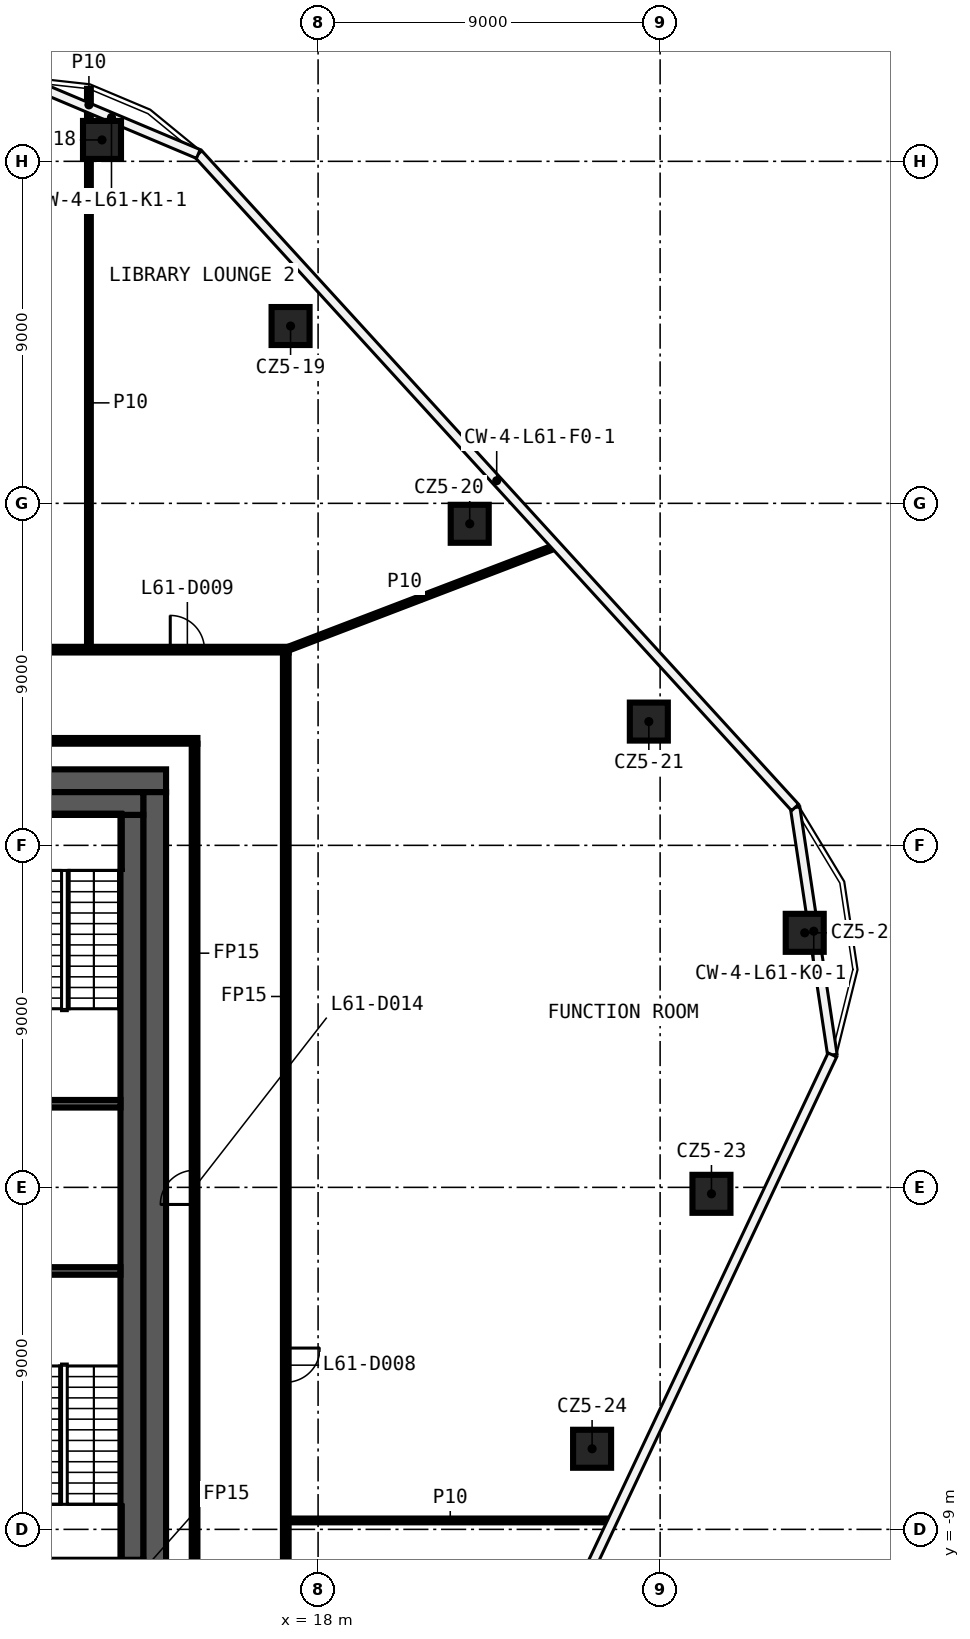
"""IFC4 building model, lengths in metres.
Left out: names, types, materials, properties, quantities, classifications, styles, units other than length and angle.
Written with IfcOpenShell. Run it as: python <this file> out.ifc"""

import sys

from ifc_helpers import new_model, si_unit, direction, frame, frame_2d, origin, origin_2d, place, context, subcontext, project, spatial, rectangle, extrude, element, fill, save


model = new_model("IFC4")
c1 = context("Model", 3, precision=1e-05, world=origin(), true_north=direction((0.0, 1.0)))
c2 = subcontext(c1, "Body", "Model", "MODEL_VIEW")
j1 = project(units=[si_unit("LENGTHUNIT", "METRE"), si_unit("PLANEANGLEUNIT", "RADIAN")], contexts=[c1])
p1 = place(None, origin())
s1 = spatial("IfcSite", under=j1, at=p1, CompositionType="ELEMENT")
p2 = place(p1, origin())
s2 = spatial("IfcBuilding", under=s1, at=p2, CompositionType="ELEMENT")
p3 = place(p2, frame((0.0, 0.0, 289.2)))
s3 = spatial("IfcBuildingStorey", under=s2, at=p3, CompositionType="ELEMENT", Elevation=289.2)
for number, where, z_axis, x_axis in (
    (1, (12.314, 27.563, 0.0), (0.0, 0.0, 1.0), (1.0, 0.0, 0.0)),
    (2, (17.276, 22.666, 0.0), (0.0, 0.0, 1.0), (1.0, 0.0, 0.0)),
    (3, (21.99, 17.462, 0.0), (0.0, 0.0, 1.0), (1.0, 0.0, 0.0)),
    (4, (26.703, 12.257, 0.0), (0.0, 0.0, 1.0), (1.0, 0.0, 0.0)),
    (5, (30.805, 6.698, 0.0), (0.0, 0.0, 1.0), (1.0, 0.0, 0.0)),
    (6, (28.351, -0.17, 0.0), (0.0, 0.0, 1.0), (1.0, 0.0, 0.0)),
    (7, (25.21, -6.879, 0.0), (0.0, 0.0, 1.0), (1.0, 0.0, 0.0)),
):
    element("IfcColumn", number, at=place(p3, frame(where, z_axis=z_axis, x_axis=x_axis)), inside=s3, PredefinedType="COLUMN", context=c2, shape_type="SweptSolid", body=[
        extrude(rectangle(XDim=1.0, YDim=1.0, at=origin_2d()), origin(), (0.0, 0.0, 1.0), 4.62),
    ])
p4 = place(p3, frame((17.225, -8.765, 0.0), z_axis=(0.0, 0.0, 1.0), x_axis=(1.0, 0.0, 0.0)))
e8 = element("IfcWall", 8, at=p4, inside=s3, PredefinedType="PARTITIONING", context=c2, shape_type="SweptSolid", body=[
    extrude(rectangle(XDim=8.505, YDim=0.1, at=frame_2d((4.253, 0.0))), origin(), (0.0, 0.0, 1.0), 4.62),
])
p5 = place(p3, frame((3.6, 11.75, 0.0), z_axis=(0.0, 0.0, 1.0), x_axis=(1.0, 0.0, 0.0)))
e9 = element("IfcWall", 9, at=p5, inside=s3, PredefinedType="PARTITIONING", context=c2, shape_type="SweptSolid", body=[
    extrude(rectangle(XDim=11.225, YDim=0.15, at=frame_2d((5.612, 0.0))), origin(), (0.0, 0.0, 1.0), 4.62),
])
p6 = place(p3, frame((-17.225, 14.15, 0.0), z_axis=(0.0, 0.0, 1.0), x_axis=(1.0, 0.0, 0.0)))
e10 = element("IfcWall", 10, at=p6, inside=s3, PredefinedType="PARTITIONING", context=c2, shape_type="SweptSolid", body=[
    extrude(rectangle(XDim=34.45, YDim=0.15, at=frame_2d((17.225, 0.0))), origin(), (0.0, 0.0, 1.0), 4.62),
])
p7 = place(p6, frame((31.335, 0.0, 0.0)))
e11 = element("IfcOpeningElement", 11, at=p7, cuts=e10, PredefinedType="OPENING", context=c2, shape_type="SweptSolid", body=[
    extrude(rectangle(XDim=0.9, YDim=2.1, at=frame_2d((0.45, 1.05))), frame((0.0, 0.085, 0.0), z_axis=(0.0, -1.0, 0.0), x_axis=(1.0, 0.0, 0.0)), (0.0, 0.0, 1.0), 0.17),
])
p8 = place(p6, frame((25.601, 0.0, 0.0)))
e12 = element("IfcOpeningElement", 12, at=p8, cuts=e10, PredefinedType="OPENING", context=c2, shape_type="SweptSolid", body=[
    extrude(rectangle(XDim=0.9, YDim=2.1, at=frame_2d((0.45, 1.05))), frame((0.0, 0.085, 0.0), z_axis=(0.0, -1.0, 0.0), x_axis=(1.0, 0.0, 0.0)), (0.0, 0.0, 1.0), 0.17),
])
p9 = place(p6, frame((17.852, 0.0, 0.0)))
e13 = element("IfcOpeningElement", 13, at=p9, cuts=e10, PredefinedType="OPENING", context=c2, shape_type="SweptSolid", body=[
    extrude(rectangle(XDim=0.9, YDim=2.1, at=frame_2d((0.45, 1.05))), frame((0.0, 0.085, 0.0), z_axis=(0.0, -1.0, 0.0), x_axis=(1.0, 0.0, 0.0)), (0.0, 0.0, 1.0), 0.17),
])
p10 = place(p3, frame((17.15, 14.15, 0.0), z_axis=(0.0, 0.0, 1.0), x_axis=(0.93402253364, 0.357214090782, 0.0)))
e14 = element("IfcWall", 14, at=p10, inside=s3, PredefinedType="PARTITIONING", context=c2, shape_type="SweptSolid", body=[
    extrude(rectangle(XDim=7.604, YDim=0.1, at=frame_2d((3.802, 0.0))), origin(), (0.0, 0.0, 1.0), 4.62),
])
p11 = place(p3, frame((17.15, 14.075, 0.0), z_axis=(0.0, 0.0, 1.0), x_axis=(0.0, -1.0, 0.0)))
e15 = element("IfcWall", 15, at=p11, inside=s3, PredefinedType="PARTITIONING", context=c2, shape_type="SweptSolid", body=[
    extrude(rectangle(XDim=28.15, YDim=0.15, at=frame_2d((14.075, 0.0))), origin(), (0.0, 0.0, 1.0), 4.62),
])
p12 = place(p11, frame((24.433, 0.0, 0.0)))
e16 = element("IfcOpeningElement", 16, at=p12, cuts=e15, PredefinedType="OPENING", context=c2, shape_type="SweptSolid", body=[
    extrude(rectangle(XDim=0.9, YDim=2.1, at=frame_2d((0.45, 1.05))), frame((0.0, 0.085, 0.0), z_axis=(0.0, -1.0, 0.0), x_axis=(1.0, 0.0, 0.0)), (0.0, 0.0, 1.0), 0.17),
])
p13 = place(p11, frame((18.304, 0.0, 0.0)))
e17 = element("IfcOpeningElement", 17, at=p13, cuts=e15, PredefinedType="OPENING", context=c2, shape_type="SweptSolid", body=[
    extrude(rectangle(XDim=0.9, YDim=2.1, at=frame_2d((0.45, 1.05))), frame((0.0, 0.085, 0.0), z_axis=(0.0, -1.0, 0.0), x_axis=(1.0, 0.0, 0.0)), (0.0, 0.0, 1.0), 0.17),
])
p14 = place(p3, frame((14.75, -11.675, 0.0), z_axis=(0.0, 0.0, 1.0), x_axis=(0.0, 1.0, 0.0)))
e18 = element("IfcWall", 18, at=p14, inside=s3, PredefinedType="PARTITIONING", context=c2, shape_type="SweptSolid", body=[
    extrude(rectangle(XDim=23.35, YDim=0.15, at=frame_2d((11.675, 0.0))), origin(), (0.0, 0.0, 1.0), 4.62),
])
p15 = place(p14, frame((11.225, 0.0, 0.0)))
e19 = element("IfcOpeningElement", 19, at=p15, cuts=e18, PredefinedType="OPENING", context=c2, shape_type="SweptSolid", body=[
    extrude(rectangle(XDim=0.9, YDim=2.1, at=frame_2d((0.45, 1.05))), frame((0.0, 0.085, 0.0), z_axis=(0.0, -1.0, 0.0), x_axis=(1.0, 0.0, 0.0)), (0.0, 0.0, 1.0), 0.17),
])
p16 = place(p3, frame((11.97, 14.225, 0.0), z_axis=(0.0, 0.0, 1.0), x_axis=(0.0, 1.0, 0.0)))
e20 = element("IfcWall", 20, at=p16, inside=s3, PredefinedType="PARTITIONING", context=c2, shape_type="SweptSolid", body=[
    extrude(rectangle(XDim=12.838, YDim=0.1, at=frame_2d((6.419, 0.0))), origin(), (0.0, 0.0, 1.0), 4.62),
])
p17 = place(p3, frame((11.97, 28.063, 0.0), z_axis=(0.0, 0.0, 1.0), x_axis=(0.0, 1.0, 0.0)))
e21 = element("IfcWall", 21, at=p17, inside=s3, PredefinedType="PARTITIONING", context=c2, shape_type="SweptSolid", body=[
    extrude(rectangle(XDim=0.845, YDim=0.1, at=frame_2d((0.423, 0.0))), origin(), (0.0, 0.0, 1.0), 4.62),
])
p18 = place(p3, frame((-14.0, 10.7, 0.0), z_axis=(0.0, 0.0, 1.0), x_axis=(1.0, 0.0, 0.0)))
e22 = element("IfcWall", 22, at=p18, inside=s3, PredefinedType="SHEAR", context=c2, shape_type="SweptSolid", body=[
    extrude(rectangle(XDim=28.0, YDim=0.6, at=frame_2d((14.0, 0.0))), origin(), (0.0, 0.0, 1.0), 4.62),
])
p19 = place(p18, frame((15.9, 0.0, 0.0)))
e23 = element("IfcOpeningElement", 23, at=p19, cuts=e22, PredefinedType="OPENING", context=c2, shape_type="SweptSolid", body=[
    extrude(rectangle(XDim=1.6, YDim=2.1, at=frame_2d((0.8, 1.05))), frame((0.0, 0.31, 0.0), z_axis=(0.0, -1.0, 0.0), x_axis=(1.0, 0.0, 0.0)), (0.0, 0.0, 1.0), 0.62),
])
p20 = place(p3, frame((13.7, 10.4, 0.0), z_axis=(0.0, 0.0, 1.0), x_axis=(0.0, -1.0, 0.0)))
e24 = element("IfcWall", 24, at=p20, inside=s3, PredefinedType="SHEAR", context=c2, shape_type="SweptSolid", body=[
    extrude(rectangle(XDim=20.8, YDim=0.6, at=frame_2d((10.4, 0.0))), origin(), (0.0, 0.0, 1.0), 4.62),
])
p21 = place(p3, frame((3.9, 10.1, 0.0), z_axis=(0.0, 0.0, 1.0), x_axis=(1.0, 0.0, 0.0)))
e25 = element("IfcWall", 25, at=p21, inside=s3, PredefinedType="SHEAR", context=c2, shape_type="SweptSolid", body=[
    extrude(rectangle(XDim=9.5, YDim=0.6, at=frame_2d((4.75, 0.0))), origin(), (0.0, 0.0, 1.0), 4.62),
])
p22 = place(p3, frame((13.1, 9.8, 0.0), z_axis=(0.0, 0.0, 1.0), x_axis=(0.0, -1.0, 0.0)))
e26 = element("IfcWall", 26, at=p22, inside=s3, PredefinedType="SHEAR", context=c2, shape_type="SweptSolid", body=[
    extrude(rectangle(XDim=19.6, YDim=0.6, at=frame_2d((9.8, 0.0))), origin(), (0.0, 0.0, 1.0), 4.62),
])
for number, where, z_axis, x_axis in (
    (27, (9.45, 2.2, 0.0), (0.0, 0.0, 1.0), (1.0, 0.0, 0.0)),
    (28, (9.45, -2.2, 0.0), (0.0, 0.0, 1.0), (1.0, 0.0, 0.0)),
):
    element("IfcWall", number, at=place(p3, frame(where, z_axis=z_axis, x_axis=x_axis)), inside=s3, PredefinedType="SHEAR", context=c2, shape_type="SweptSolid", body=[
        extrude(rectangle(XDim=3.35, YDim=0.2, at=frame_2d((1.675, 0.0))), origin(), (0.0, 0.0, 1.0), 4.62),
    ])
p23 = place(p13, origin())
e29 = element("IfcDoor", 29, at=p23, inside=s3, OperationType="SINGLE_SWING_LEFT", PredefinedType="DOOR", context=c2, shape_type="SweptSolid", body=[
    extrude(rectangle(XDim=0.9, YDim=2.1, at=frame_2d((0.45, 1.05))), frame((0.0, 0.025, 0.0), z_axis=(0.0, -1.0, 0.0), x_axis=(1.0, 0.0, 0.0)), (0.0, 0.0, 1.0), 0.05),
])
fill(e17, e29)
p24 = place(p7, origin())
e30 = element("IfcDoor", 30, at=p24, inside=s3, OperationType="SINGLE_SWING_RIGHT", PredefinedType="DOOR", context=c2, shape_type="SweptSolid", body=[
    extrude(rectangle(XDim=0.9, YDim=2.1, at=frame_2d((0.45, 1.05))), frame((0.0, 0.025, 0.0), z_axis=(0.0, -1.0, 0.0), x_axis=(1.0, 0.0, 0.0)), (0.0, 0.0, 1.0), 0.05),
])
fill(e11, e30)
p25 = place(p15, origin())
e31 = element("IfcDoor", 31, at=p25, inside=s3, OperationType="SINGLE_SWING_LEFT", PredefinedType="DOOR", context=c2, shape_type="SweptSolid", body=[
    extrude(rectangle(XDim=0.9, YDim=2.1, at=frame_2d((0.45, 1.05))), frame((0.0, 0.025, 0.0), z_axis=(0.0, -1.0, 0.0), x_axis=(1.0, 0.0, 0.0)), (0.0, 0.0, 1.0), 0.05),
])
fill(e19, e31)
save(model, sys.argv[1])
